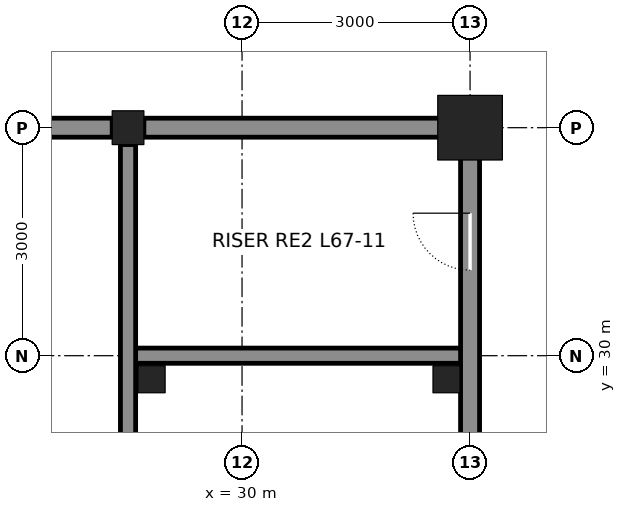
"""IFC4 building model, lengths in metres.
Left out: names, types, materials, properties, quantities, classifications, styles, units other than length and angle.
Written with IfcOpenShell. Run it as: python <this file> out.ifc"""

import sys

from ifc_helpers import new_model, si_unit, direction, frame, frame_2d, origin, origin_2d, place, context, subcontext, project, spatial, rectangle, hollow_rectangle, i_section, extrude, element, fill, save


model = new_model("IFC4")
c1 = context("Model", 3, precision=1e-05, world=origin(), true_north=direction((0.0, 1.0)))
c2 = subcontext(c1, "Body", "Model", "MODEL_VIEW")
j1 = project(units=[si_unit("LENGTHUNIT", "METRE"), si_unit("PLANEANGLEUNIT", "RADIAN")], contexts=[c1])
p1 = place(None, origin())
s1 = spatial("IfcSite", under=j1, at=p1, CompositionType="ELEMENT")
p2 = place(p1, origin())
s2 = spatial("IfcBuilding", under=s1, at=p2, CompositionType="ELEMENT")
p3 = place(p2, frame((0.0, 0.0, 300.0)))
s3 = spatial("IfcBuildingStorey", under=s2, at=p3, CompositionType="ELEMENT", Elevation=300.0)
p4 = place(p3, frame((28.5, 33.0, 0.0), z_axis=(0.0, 0.0, 1.0), x_axis=(1.0, 0.0, 0.0)))
e1 = element("IfcColumn", 1, at=p4, inside=s3, PredefinedType="COLUMN", context=c2, shape_type="SweptSolid", body=[
    extrude(i_section(OverallWidth=0.417, OverallDepth=0.445, WebThickness=0.039, FlangeThickness=0.063, at=origin_2d()), origin(), (0.0, 0.0, 1.0), 6.0),
])
p5 = place(p3, frame((33.0, 33.0, 0.0), z_axis=(0.0, 0.0, 1.0), x_axis=(1.0, 0.0, 0.0)))
e2 = element("IfcColumn", 2, at=p5, inside=s3, PredefinedType="COLUMN", context=c2, shape_type="SweptSolid", body=[
    extrude(hollow_rectangle(XDim=0.85, YDim=0.85, WallThickness=0.085, at=origin_2d()), origin(), (0.0, 0.0, 1.0), 6.0),
])
p6 = place(p3, frame((28.5, 30.0, 0.0), z_axis=(0.0, 0.0, 1.0), x_axis=(1.0, 0.0, 0.0)))
e3 = element("IfcWall", 3, at=p6, inside=s3, PredefinedType="SOLIDWALL", context=c2, shape_type="SweptSolid", body=[
    extrude(rectangle(XDim=4.5, YDim=0.2, at=frame_2d((2.25, 0.0))), origin(), (0.0, 0.0, 1.0), 5.84),
])
p7 = place(p3, frame((25.708, 33.0, 0.0), z_axis=(0.0, 0.0, 1.0), x_axis=(1.0, 0.0, 0.0)))
e4 = element("IfcWall", 4, at=p7, inside=s3, PredefinedType="SOLIDWALL", context=c2, shape_type="SweptSolid", body=[
    extrude(rectangle(XDim=2.583, YDim=0.25, at=frame_2d((1.292, 0.0))), origin(), (0.0, 0.0, 1.0), 4.981),
])
p8 = place(p3, frame((28.708, 33.0, 0.0), z_axis=(0.0, 0.0, 1.0), x_axis=(1.0, 0.0, 0.0)))
e5 = element("IfcWall", 5, at=p8, inside=s3, PredefinedType="SOLIDWALL", context=c2, shape_type="SweptSolid", body=[
    extrude(rectangle(XDim=4.042, YDim=0.25, at=frame_2d((2.021, 0.0))), origin(), (0.0, 0.0, 1.0), 4.981),
])
p9 = place(p3, frame((28.5, 24.222, 0.0), z_axis=(0.0, 0.0, 1.0), x_axis=(0.0, 1.0, 0.0)))
e6 = element("IfcWall", 6, at=p9, inside=s3, PredefinedType="SOLIDWALL", context=c2, shape_type="SweptSolid", body=[
    extrude(rectangle(XDim=8.555, YDim=0.2, at=frame_2d((4.278, 0.0))), origin(), (0.0, 0.0, 1.0), 4.913),
])
p10 = place(p3, frame((33.0, 24.222, 0.0), z_axis=(0.0, 0.0, 1.0), x_axis=(0.0, 1.0, 0.0)))
e7 = element("IfcWall", 7, at=p10, inside=s3, PredefinedType="SOLIDWALL", context=c2, shape_type="SweptSolid", body=[
    extrude(rectangle(XDim=8.528, YDim=0.25, at=frame_2d((4.264, 0.0))), origin(), (0.0, 0.0, 1.0), 4.913),
])
p11 = place(p10, frame((6.903, 0.0, 0.0)))
e8 = element("IfcOpeningElement", 8, at=p11, cuts=e7, PredefinedType="OPENING", context=c2, shape_type="SweptSolid", body=[
    extrude(rectangle(XDim=0.75, YDim=2.1, at=frame_2d((0.375, 1.05))), frame((0.0, 0.135, 0.0), z_axis=(0.0, -1.0, 0.0), x_axis=(1.0, 0.0, 0.0)), (0.0, 0.0, 1.0), 0.27),
])
for number, where, z_axis, x_axis in (
    (9, (28.81, 29.69, 0.0), (0.0, 0.0, 1.0), (1.0, 0.0, 0.0)),
    (10, (32.69, 29.69, 0.0), (0.0, 0.0, 1.0), (1.0, 0.0, 0.0)),
):
    element("IfcColumn", number, at=place(p3, frame(where, z_axis=z_axis, x_axis=x_axis)), inside=s3, PredefinedType="COLUMN", context=c2, shape_type="SweptSolid", body=[
        extrude(hollow_rectangle(XDim=0.356, YDim=0.356, WallThickness=0.009, at=origin_2d()), origin(), (0.0, 0.0, 1.0), 5.8),
    ])
p12 = place(p11, origin())
e11 = element("IfcDoor", 11, at=p12, inside=s3, OperationType="SINGLE_SWING_RIGHT", PredefinedType="DOOR", context=c2, shape_type="SweptSolid", body=[
    extrude(rectangle(XDim=0.75, YDim=2.1, at=frame_2d((0.375, 1.05))), frame((0.0, 0.025, 0.0), z_axis=(0.0, -1.0, 0.0), x_axis=(1.0, 0.0, 0.0)), (0.0, 0.0, 1.0), 0.05),
])
fill(e8, e11)
save(model, sys.argv[1])
